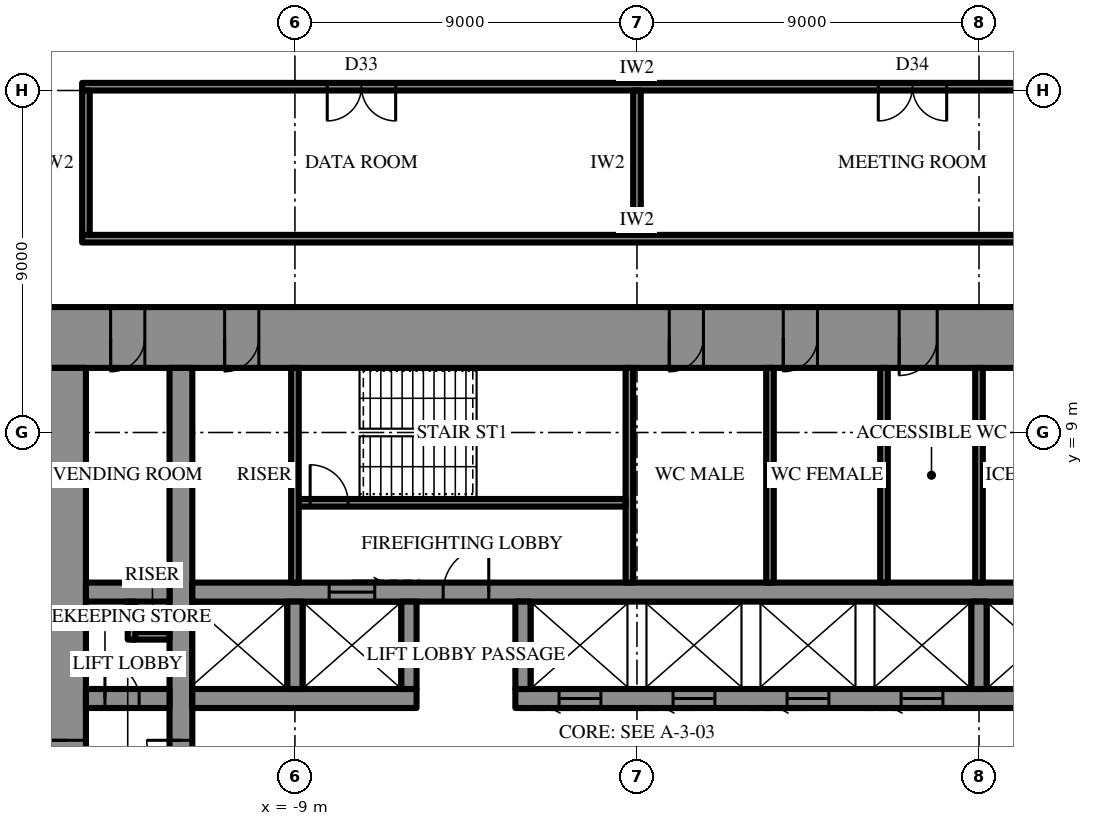
"""IFC4 building model, lengths in metres.
Left out: names, types, materials, properties, quantities, classifications, styles, units other than length and angle.
Written with IfcOpenShell. Run it as: python <this file> out.ifc"""

import sys

from ifc_helpers import new_model, si_unit, direction, frame, frame_2d, origin, place, context, subcontext, project, spatial, rectangle, extrude, element, fill, save


model = new_model("IFC4")
c1 = context("Model", 3, precision=1e-05, world=origin(), true_north=direction((0.0, 1.0)))
c2 = subcontext(c1, "Body", "Model", "MODEL_VIEW")
j1 = project(units=[si_unit("LENGTHUNIT", "METRE"), si_unit("PLANEANGLEUNIT", "RADIAN")], contexts=[c1])
p1 = place(None, origin())
s1 = spatial("IfcSite", under=j1, at=p1, CompositionType="ELEMENT")
p2 = place(p1, origin())
s2 = spatial("IfcBuilding", under=s1, at=p2, CompositionType="ELEMENT")
p3 = place(p2, frame((0.0, 0.0, 274.3)))
s3 = spatial("IfcBuildingStorey", under=s2, at=p3, CompositionType="ELEMENT", Elevation=274.3)
p4 = place(p3, frame((-15.5, 11.5, 0.0), z_axis=(0.0, 0.0, 1.0), x_axis=(1.0, 0.0, 0.0)))
e1 = element("IfcWall", 1, at=p4, inside=s3, PredefinedType="SHEAR", context=c2, shape_type="SweptSolid", body=[
    extrude(rectangle(XDim=31.0, YDim=1.6, at=frame_2d((15.5, 0.0))), origin(), (0.0, 0.0, 1.0), 4.2),
])
p5 = place(p4, frame((16.35, 0.0, 0.0)))
e2 = element("IfcOpeningElement", 2, at=p5, cuts=e1, PredefinedType="OPENING", context=c2, shape_type="SweptSolid", body=[
    extrude(rectangle(XDim=0.9, YDim=2.2, at=frame_2d((0.45, 1.1))), frame((0.0, 0.81, 0.0), z_axis=(0.0, -1.0, 0.0), x_axis=(1.0, 0.0, 0.0)), (0.0, 0.0, 1.0), 1.62),
])
p6 = place(p4, frame((19.35, 0.0, 0.0)))
e3 = element("IfcOpeningElement", 3, at=p6, cuts=e1, PredefinedType="OPENING", context=c2, shape_type="SweptSolid", body=[
    extrude(rectangle(XDim=0.9, YDim=2.2, at=frame_2d((0.45, 1.1))), frame((0.0, 0.81, 0.0), z_axis=(0.0, -1.0, 0.0), x_axis=(1.0, 0.0, 0.0)), (0.0, 0.0, 1.0), 1.62),
])
p7 = place(p4, frame((22.4, 0.0, 0.0)))
e4 = element("IfcOpeningElement", 4, at=p7, cuts=e1, PredefinedType="OPENING", context=c2, shape_type="SweptSolid", body=[
    extrude(rectangle(XDim=1.0, YDim=2.2, at=frame_2d((0.5, 1.1))), frame((0.0, 0.81, 0.0), z_axis=(0.0, -1.0, 0.0), x_axis=(1.0, 0.0, 0.0)), (0.0, 0.0, 1.0), 1.62),
])
p8 = place(p4, frame((1.65, 0.0, 0.0)))
e5 = element("IfcOpeningElement", 5, at=p8, cuts=e1, PredefinedType="OPENING", context=c2, shape_type="SweptSolid", body=[
    extrude(rectangle(XDim=0.9, YDim=2.2, at=frame_2d((0.45, 1.1))), frame((0.0, 0.81, 0.0), z_axis=(0.0, -1.0, 0.0), x_axis=(1.0, 0.0, 0.0)), (0.0, 0.0, 1.0), 1.62),
])
p9 = place(p4, frame((4.65, 0.0, 0.0)))
e6 = element("IfcOpeningElement", 6, at=p9, cuts=e1, PredefinedType="OPENING", context=c2, shape_type="SweptSolid", body=[
    extrude(rectangle(XDim=0.9, YDim=2.2, at=frame_2d((0.45, 1.1))), frame((0.0, 0.81, 0.0), z_axis=(0.0, -1.0, 0.0), x_axis=(1.0, 0.0, 0.0)), (0.0, 0.0, 1.0), 1.62),
])
p10 = place(p4, frame((25.45, 0.0, 0.0)))
e7 = element("IfcOpeningElement", 7, at=p10, cuts=e1, PredefinedType="OPENING", context=c2, shape_type="SweptSolid", body=[
    extrude(rectangle(XDim=0.9, YDim=2.2, at=frame_2d((0.45, 1.1))), frame((0.0, 0.81, 0.0), z_axis=(0.0, -1.0, 0.0), x_axis=(1.0, 0.0, 0.0)), (0.0, 0.0, 1.0), 1.62),
])
p11 = place(p4, frame((28.45, 0.0, 0.0)))
e8 = element("IfcOpeningElement", 8, at=p11, cuts=e1, PredefinedType="OPENING", context=c2, shape_type="SweptSolid", body=[
    extrude(rectangle(XDim=0.9, YDim=2.2, at=frame_2d((0.45, 1.1))), frame((0.0, 0.81, 0.0), z_axis=(0.0, -1.0, 0.0), x_axis=(1.0, 0.0, 0.0)), (0.0, 0.0, 1.0), 1.62),
])
p12 = place(p3, frame((-15.0, 10.7, 0.0), z_axis=(0.0, 0.0, 1.0), x_axis=(0.0, -1.0, 0.0)))
e9 = element("IfcWall", 9, at=p12, inside=s3, PredefinedType="SHEAR", context=c2, shape_type="SweptSolid", body=[
    extrude(rectangle(XDim=21.4, YDim=1.0, at=frame_2d((10.7, 0.0))), origin(), (0.0, 0.0, 1.0), 4.2),
])
p13 = place(p12, frame((9.8, 0.0, 0.0)))
e10 = element("IfcOpeningElement", 10, at=p13, cuts=e9, PredefinedType="OPENING", context=c2, shape_type="SweptSolid", body=[
    extrude(rectangle(XDim=1.8, YDim=2.4, at=frame_2d((0.9, 1.2))), frame((0.0, 0.51, 0.0), z_axis=(0.0, -1.0, 0.0), x_axis=(1.0, 0.0, 0.0)), (0.0, 0.0, 1.0), 1.02),
])
p14 = place(p3, frame((-12.0, -10.7, 0.0), z_axis=(0.0, 0.0, 1.0), x_axis=(0.0, 1.0, 0.0)))
e11 = element("IfcWall", 11, at=p14, inside=s3, PredefinedType="SHEAR", context=c2, shape_type="SweptSolid", body=[
    extrude(rectangle(XDim=21.4, YDim=0.6, at=frame_2d((10.7, 0.0))), origin(), (0.0, 0.0, 1.0), 4.2),
])
p15 = place(p14, frame((9.8, 0.0, 0.0)))
e12 = element("IfcOpeningElement", 12, at=p15, cuts=e11, PredefinedType="OPENING", context=c2, shape_type="SweptSolid", body=[
    extrude(rectangle(XDim=1.8, YDim=2.4, at=frame_2d((0.9, 1.2))), frame((0.0, 0.31, 0.0), z_axis=(0.0, -1.0, 0.0), x_axis=(1.0, 0.0, 0.0)), (0.0, 0.0, 1.0), 0.62),
])
p16 = place(p3, frame((-14.5, 2.0, 0.0), z_axis=(0.0, 0.0, 1.0), x_axis=(1.0, 0.0, 0.0)))
e13 = element("IfcWall", 13, at=p16, inside=s3, PredefinedType="SHEAR", context=c2, shape_type="SweptSolid", body=[
    extrude(rectangle(XDim=2.2, YDim=0.5, at=frame_2d((1.1, 0.0))), origin(), (0.0, 0.0, 1.0), 4.2),
])
p17 = place(p16, frame((0.5, 0.0, 0.0)))
e14 = element("IfcOpeningElement", 14, at=p17, cuts=e13, PredefinedType="OPENING", context=c2, shape_type="SweptSolid", body=[
    extrude(rectangle(XDim=0.9, YDim=2.2, at=frame_2d((0.45, 1.1))), frame((0.0, 0.26, 0.0), z_axis=(0.0, -1.0, 0.0), x_axis=(1.0, 0.0, 0.0)), (0.0, 0.0, 1.0), 0.52),
])
p18 = place(p3, frame((-11.7, 2.0, 0.0), z_axis=(0.0, 0.0, 1.0), x_axis=(1.0, 0.0, 0.0)))
e15 = element("IfcWall", 15, at=p18, inside=s3, PredefinedType="SHEAR", context=c2, shape_type="SweptSolid", body=[
    extrude(rectangle(XDim=5.9, YDim=0.5, at=frame_2d((2.95, 0.0))), origin(), (0.0, 0.0, 1.0), 4.2),
])
p19 = place(p3, frame((-3.2, 2.0, 0.0), z_axis=(0.0, 0.0, 1.0), x_axis=(1.0, 0.0, 0.0)))
e16 = element("IfcWall", 16, at=p19, inside=s3, PredefinedType="SHEAR", context=c2, shape_type="SweptSolid", body=[
    extrude(rectangle(XDim=14.9, YDim=0.5, at=frame_2d((7.45, 0.0))), origin(), (0.0, 0.0, 1.0), 4.2),
])
p20 = place(p19, frame((1.15, 0.0, 0.0)))
e17 = element("IfcOpeningElement", 17, at=p20, cuts=e16, PredefinedType="OPENING", context=c2, shape_type="SweptSolid", body=[
    extrude(rectangle(XDim=1.1, YDim=2.2, at=frame_2d((0.55, 1.1))), frame((0.0, 0.26, 0.0), z_axis=(0.0, -1.0, 0.0), x_axis=(1.0, 0.0, 0.0)), (0.0, 0.0, 1.0), 0.52),
])
p21 = place(p19, frame((4.15, 0.0, 0.0)))
e18 = element("IfcOpeningElement", 18, at=p21, cuts=e16, PredefinedType="OPENING", context=c2, shape_type="SweptSolid", body=[
    extrude(rectangle(XDim=1.1, YDim=2.2, at=frame_2d((0.55, 1.1))), frame((0.0, 0.26, 0.0), z_axis=(0.0, -1.0, 0.0), x_axis=(1.0, 0.0, 0.0)), (0.0, 0.0, 1.0), 0.52),
])
p22 = place(p19, frame((7.15, 0.0, 0.0)))
e19 = element("IfcOpeningElement", 19, at=p22, cuts=e16, PredefinedType="OPENING", context=c2, shape_type="SweptSolid", body=[
    extrude(rectangle(XDim=1.1, YDim=2.2, at=frame_2d((0.55, 1.1))), frame((0.0, 0.26, 0.0), z_axis=(0.0, -1.0, 0.0), x_axis=(1.0, 0.0, 0.0)), (0.0, 0.0, 1.0), 0.52),
])
p23 = place(p19, frame((10.15, 0.0, 0.0)))
e20 = element("IfcOpeningElement", 20, at=p23, cuts=e16, PredefinedType="OPENING", context=c2, shape_type="SweptSolid", body=[
    extrude(rectangle(XDim=1.1, YDim=2.2, at=frame_2d((0.55, 1.1))), frame((0.0, 0.26, 0.0), z_axis=(0.0, -1.0, 0.0), x_axis=(1.0, 0.0, 0.0)), (0.0, 0.0, 1.0), 0.52),
])
p24 = place(p3, frame((-14.5, 4.8, 0.0), z_axis=(0.0, 0.0, 1.0), x_axis=(1.0, 0.0, 0.0)))
e21 = element("IfcWall", 21, at=p24, inside=s3, PredefinedType="SHEAR", context=c2, shape_type="SweptSolid", body=[
    extrude(rectangle(XDim=2.2, YDim=0.5, at=frame_2d((1.1, 0.0))), origin(), (0.0, 0.0, 1.0), 4.2),
])
p25 = place(p3, frame((-11.7, 4.8, 0.0), z_axis=(0.0, 0.0, 1.0), x_axis=(1.0, 0.0, 0.0)))
e22 = element("IfcWall", 22, at=p25, inside=s3, PredefinedType="SHEAR", context=c2, shape_type="SweptSolid", body=[
    extrude(rectangle(XDim=23.4, YDim=0.5, at=frame_2d((11.7, 0.0))), origin(), (0.0, 0.0, 1.0), 4.2),
])
p26 = place(p25, frame((6.6, 0.0, 0.0)))
e23 = element("IfcOpeningElement", 23, at=p26, cuts=e22, PredefinedType="OPENING", context=c2, shape_type="SweptSolid", body=[
    extrude(rectangle(XDim=1.2, YDim=2.2, at=frame_2d((0.6, 1.1))), frame((0.0, 0.26, 0.0), z_axis=(0.0, -1.0, 0.0), x_axis=(1.0, 0.0, 0.0)), (0.0, 0.0, 1.0), 0.52),
])
p27 = place(p25, frame((3.6, 0.0, 0.0)))
e24 = element("IfcOpeningElement", 24, at=p27, cuts=e22, PredefinedType="OPENING", context=c2, shape_type="SweptSolid", body=[
    extrude(rectangle(XDim=1.2, YDim=2.2, at=frame_2d((0.6, 1.1))), frame((0.0, 0.26, 0.0), z_axis=(0.0, -1.0, 0.0), x_axis=(1.0, 0.0, 0.0)), (0.0, 0.0, 1.0), 0.52),
])
for number, where, z_axis, x_axis in (
    (25, (-9.0, 2.25, 0.0), (0.0, 0.0, 1.0), (0.0, 1.0, 0.0)),
    (26, (-6.0, 2.25, 0.0), (0.0, 0.0, 1.0), (0.0, 1.0, 0.0)),
    (27, (-3.0, 2.25, 0.0), (0.0, 0.0, 1.0), (0.0, 1.0, 0.0)),
    (28, (9.0, 2.25, 0.0), (0.0, 0.0, 1.0), (0.0, 1.0, 0.0)),
):
    element("IfcWall", number, at=place(p3, frame(where, z_axis=z_axis, x_axis=x_axis)), inside=s3, PredefinedType="SHEAR", context=c2, shape_type="SweptSolid", body=[
        extrude(rectangle(XDim=2.3, YDim=0.4, at=frame_2d((1.15, 0.0))), origin(), (0.0, 0.0, 1.0), 4.2),
    ])
p28 = place(p3, frame((-0.2, 5.05, 0.0), z_axis=(0.0, 0.0, 1.0), x_axis=(0.0, 1.0, 0.0)))
e29 = element("IfcWall", 29, at=p28, inside=s3, PredefinedType="SHEAR", context=c2, shape_type="SweptSolid", body=[
    extrude(rectangle(XDim=5.65, YDim=0.2, at=frame_2d((2.825, 0.0))), origin(), (0.0, 0.0, 1.0), 4.2),
])
p29 = place(p3, frame((-8.9, 7.15, 0.0), z_axis=(0.0, 0.0, 1.0), x_axis=(1.0, 0.0, 0.0)))
e30 = element("IfcWall", 30, at=p29, inside=s3, PredefinedType="SHEAR", context=c2, shape_type="SweptSolid", body=[
    extrude(rectangle(XDim=8.6, YDim=0.2, at=frame_2d((4.3, 0.0))), origin(), (0.0, 0.0, 1.0), 4.2),
])
p30 = place(p29, frame((0.3, 0.0, 0.0)))
e31 = element("IfcOpeningElement", 31, at=p30, cuts=e30, PredefinedType="OPENING", context=c2, shape_type="SweptSolid", body=[
    extrude(rectangle(XDim=1.0, YDim=2.2, at=frame_2d((0.5, 1.1))), frame((0.0, 0.11, 0.0), z_axis=(0.0, -1.0, 0.0), x_axis=(1.0, 0.0, 0.0)), (0.0, 0.0, 1.0), 0.22),
])
for number, where, z_axis, x_axis in (
    (32, (-9.0, 5.05, 0.0), (0.0, 0.0, 1.0), (0.0, 1.0, 0.0)),
    (33, (9.0, 5.05, 0.0), (0.0, 0.0, 1.0), (0.0, 1.0, 0.0)),
    (34, (3.5, 5.05, 0.0), (0.0, 0.0, 1.0), (0.0, 1.0, 0.0)),
    (35, (6.5, 5.05, 0.0), (0.0, 0.0, 1.0), (0.0, 1.0, 0.0)),
):
    element("IfcWall", number, at=place(p3, frame(where, z_axis=z_axis, x_axis=x_axis)), inside=s3, PredefinedType="PARTITIONING", context=c2, shape_type="SweptSolid", body=[
        extrude(rectangle(XDim=5.65, YDim=0.2, at=frame_2d((2.825, 0.0))), origin(), (0.0, 0.0, 1.0), 4.0),
    ])
for number, where, z_axis, x_axis in (
    (36, (-13.3, 3.65, 0.0), (0.0, 0.0, 1.0), (1.0, 0.0, 0.0)),
    (37, (-13.3, 3.55, 0.0), (0.0, 0.0, 1.0), (0.0, 1.0, 0.0)),
):
    element("IfcWall", number, at=place(p3, frame(where, z_axis=z_axis, x_axis=x_axis)), inside=s3, PredefinedType="PARTITIONING", context=c2, shape_type="SweptSolid", body=[
        extrude(rectangle(XDim=1.0, YDim=0.2, at=frame_2d((0.5, 0.0))), origin(), (0.0, 0.0, 1.0), 4.0),
    ])
p31 = place(p3, frame((-14.6, 14.1, 0.0), z_axis=(0.0, 0.0, 1.0), x_axis=(1.0, 0.0, 0.0)))
e38 = element("IfcWall", 38, at=p31, inside=s3, PredefinedType="PARTITIONING", context=c2, shape_type="SweptSolid", body=[
    extrude(rectangle(XDim=29.2, YDim=0.2, at=frame_2d((14.6, 0.0))), origin(), (0.0, 0.0, 1.0), 4.0),
])
p32 = place(p3, frame((-14.6, 18.1, 0.0), z_axis=(0.0, 0.0, 1.0), x_axis=(1.0, 0.0, 0.0)))
e39 = element("IfcWall", 39, at=p32, inside=s3, PredefinedType="PARTITIONING", context=c2, shape_type="SweptSolid", body=[
    extrude(rectangle(XDim=29.2, YDim=0.2, at=frame_2d((14.6, 0.0))), origin(), (0.0, 0.0, 1.0), 4.0),
])
p33 = place(p32, frame((6.45, 0.0, 0.0)))
e40 = element("IfcOpeningElement", 40, at=p33, cuts=e39, PredefinedType="OPENING", context=c2, shape_type="SweptSolid", body=[
    extrude(rectangle(XDim=1.8, YDim=2.4, at=frame_2d((0.9, 1.2))), frame((0.0, 0.11, 0.0), z_axis=(0.0, -1.0, 0.0), x_axis=(1.0, 0.0, 0.0)), (0.0, 0.0, 1.0), 0.22),
])
p34 = place(p32, frame((20.95, 0.0, 0.0)))
e41 = element("IfcOpeningElement", 41, at=p34, cuts=e39, PredefinedType="OPENING", context=c2, shape_type="SweptSolid", body=[
    extrude(rectangle(XDim=1.8, YDim=2.4, at=frame_2d((0.9, 1.2))), frame((0.0, 0.11, 0.0), z_axis=(0.0, -1.0, 0.0), x_axis=(1.0, 0.0, 0.0)), (0.0, 0.0, 1.0), 0.22),
])
p35 = place(p3, frame((-14.5, 14.2, 0.0), z_axis=(0.0, 0.0, 1.0), x_axis=(0.0, 1.0, 0.0)))
e42 = element("IfcWall", 42, at=p35, inside=s3, PredefinedType="PARTITIONING", context=c2, shape_type="SweptSolid", body=[
    extrude(rectangle(XDim=3.8, YDim=0.2, at=frame_2d((1.9, 0.0))), origin(), (0.0, 0.0, 1.0), 4.0),
])
p36 = place(p3, frame((0.0, 14.2, 0.0), z_axis=(0.0, 0.0, 1.0), x_axis=(0.0, 1.0, 0.0)))
e43 = element("IfcWall", 43, at=p36, inside=s3, PredefinedType="PARTITIONING", context=c2, shape_type="SweptSolid", body=[
    extrude(rectangle(XDim=3.8, YDim=0.2, at=frame_2d((1.9, 0.0))), origin(), (0.0, 0.0, 1.0), 2.992),
])
p37 = place(p13, frame((1.8, 0.0, 0.0), z_axis=(0.0, 0.0, 1.0), x_axis=(-1.0, 0.0, 0.0)))
e44 = element("IfcDoor", 44, at=p37, inside=s3, OperationType="DOUBLE_DOOR_SINGLE_SWING", PredefinedType="DOOR", context=c2, shape_type="SweptSolid", body=[
    extrude(rectangle(XDim=1.8, YDim=2.4, at=frame_2d((0.9, 1.2))), frame((0.0, 0.025, 0.0), z_axis=(0.0, -1.0, 0.0), x_axis=(1.0, 0.0, 0.0)), (0.0, 0.0, 1.0), 0.05),
])
fill(e10, e44)
p38 = place(p26, origin())
e45 = element("IfcDoor", 45, at=p38, inside=s3, OperationType="SINGLE_SWING_LEFT", PredefinedType="DOOR", context=c2, shape_type="SweptSolid", body=[
    extrude(rectangle(XDim=1.2, YDim=2.2, at=frame_2d((0.6, 1.1))), frame((0.0, 0.025, 0.0), z_axis=(0.0, -1.0, 0.0), x_axis=(1.0, 0.0, 0.0)), (0.0, 0.0, 1.0), 0.05),
])
fill(e23, e45)
p39 = place(p30, origin())
e46 = element("IfcDoor", 46, at=p39, inside=s3, OperationType="SINGLE_SWING_RIGHT", PredefinedType="DOOR", context=c2, shape_type="SweptSolid", body=[
    extrude(rectangle(XDim=1.0, YDim=2.2, at=frame_2d((0.5, 1.1))), frame((0.0, 0.025, 0.0), z_axis=(0.0, -1.0, 0.0), x_axis=(1.0, 0.0, 0.0)), (0.0, 0.0, 1.0), 0.05),
])
fill(e31, e46)
p40 = place(p5, frame((0.9, 0.0, 0.0), z_axis=(0.0, 0.0, 1.0), x_axis=(-1.0, 0.0, 0.0)))
e47 = element("IfcDoor", 47, at=p40, inside=s3, OperationType="SINGLE_SWING_LEFT", PredefinedType="DOOR", context=c2, shape_type="SweptSolid", body=[
    extrude(rectangle(XDim=0.9, YDim=2.2, at=frame_2d((0.45, 1.1))), frame((0.0, 0.025, 0.0), z_axis=(0.0, -1.0, 0.0), x_axis=(1.0, 0.0, 0.0)), (0.0, 0.0, 1.0), 0.05),
])
fill(e2, e47)
p41 = place(p6, frame((0.9, 0.0, 0.0), z_axis=(0.0, 0.0, 1.0), x_axis=(-1.0, 0.0, 0.0)))
e48 = element("IfcDoor", 48, at=p41, inside=s3, OperationType="SINGLE_SWING_LEFT", PredefinedType="DOOR", context=c2, shape_type="SweptSolid", body=[
    extrude(rectangle(XDim=0.9, YDim=2.2, at=frame_2d((0.45, 1.1))), frame((0.0, 0.025, 0.0), z_axis=(0.0, -1.0, 0.0), x_axis=(1.0, 0.0, 0.0)), (0.0, 0.0, 1.0), 0.05),
])
fill(e3, e48)
p42 = place(p7, frame((1.0, 0.0, 0.0), z_axis=(0.0, 0.0, 1.0), x_axis=(-1.0, 0.0, 0.0)))
e49 = element("IfcDoor", 49, at=p42, inside=s3, OperationType="SINGLE_SWING_LEFT", PredefinedType="DOOR", context=c2, shape_type="SweptSolid", body=[
    extrude(rectangle(XDim=1.0, YDim=2.2, at=frame_2d((0.5, 1.1))), frame((0.0, 0.025, 0.0), z_axis=(0.0, -1.0, 0.0), x_axis=(1.0, 0.0, 0.0)), (0.0, 0.0, 1.0), 0.05),
])
fill(e4, e49)
p43 = place(p8, frame((0.9, 0.0, 0.0), z_axis=(0.0, 0.0, 1.0), x_axis=(-1.0, 0.0, 0.0)))
e50 = element("IfcDoor", 50, at=p43, inside=s3, OperationType="SINGLE_SWING_LEFT", PredefinedType="DOOR", context=c2, shape_type="SweptSolid", body=[
    extrude(rectangle(XDim=0.9, YDim=2.2, at=frame_2d((0.45, 1.1))), frame((0.0, 0.025, 0.0), z_axis=(0.0, -1.0, 0.0), x_axis=(1.0, 0.0, 0.0)), (0.0, 0.0, 1.0), 0.05),
])
fill(e5, e50)
p44 = place(p9, frame((0.9, 0.0, 0.0), z_axis=(0.0, 0.0, 1.0), x_axis=(-1.0, 0.0, 0.0)))
e51 = element("IfcDoor", 51, at=p44, inside=s3, OperationType="SINGLE_SWING_LEFT", PredefinedType="DOOR", context=c2, shape_type="SweptSolid", body=[
    extrude(rectangle(XDim=0.9, YDim=2.2, at=frame_2d((0.45, 1.1))), frame((0.0, 0.025, 0.0), z_axis=(0.0, -1.0, 0.0), x_axis=(1.0, 0.0, 0.0)), (0.0, 0.0, 1.0), 0.05),
])
fill(e6, e51)
p45 = place(p17, origin())
e52 = element("IfcDoor", 52, at=p45, inside=s3, OperationType="SINGLE_SWING_RIGHT", PredefinedType="DOOR", context=c2, shape_type="SweptSolid", body=[
    extrude(rectangle(XDim=0.9, YDim=2.2, at=frame_2d((0.45, 1.1))), frame((0.0, 0.025, 0.0), z_axis=(0.0, -1.0, 0.0), x_axis=(1.0, 0.0, 0.0)), (0.0, 0.0, 1.0), 0.05),
])
fill(e14, e52)
p46 = place(p15, origin())
e53 = element("IfcDoor", 53, at=p46, inside=s3, OperationType="DOUBLE_DOOR_SINGLE_SWING", PredefinedType="DOOR", context=c2, shape_type="SweptSolid", body=[
    extrude(rectangle(XDim=1.8, YDim=2.4, at=frame_2d((0.9, 1.2))), frame((0.0, 0.025, 0.0), z_axis=(0.0, -1.0, 0.0), x_axis=(1.0, 0.0, 0.0)), (0.0, 0.0, 1.0), 0.05),
])
fill(e12, e53)
p47 = place(p27, origin())
e54 = element("IfcDoor", 54, at=p47, inside=s3, OperationType="SLIDING_TO_LEFT", PredefinedType="DOOR", context=c2, shape_type="SweptSolid", body=[
    extrude(rectangle(XDim=1.2, YDim=2.2, at=frame_2d((0.6, 1.1))), frame((0.0, 0.025, 0.0), z_axis=(0.0, -1.0, 0.0), x_axis=(1.0, 0.0, 0.0)), (0.0, 0.0, 1.0), 0.05),
])
fill(e24, e54)
p48 = place(p20, frame((1.1, 0.0, 0.0), z_axis=(0.0, 0.0, 1.0), x_axis=(-1.0, 0.0, 0.0)))
e55 = element("IfcDoor", 55, at=p48, inside=s3, OperationType="SLIDING_TO_LEFT", PredefinedType="DOOR", context=c2, shape_type="SweptSolid", body=[
    extrude(rectangle(XDim=1.1, YDim=2.2, at=frame_2d((0.55, 1.1))), frame((0.0, 0.025, 0.0), z_axis=(0.0, -1.0, 0.0), x_axis=(1.0, 0.0, 0.0)), (0.0, 0.0, 1.0), 0.05),
])
fill(e17, e55)
p49 = place(p21, frame((1.1, 0.0, 0.0), z_axis=(0.0, 0.0, 1.0), x_axis=(-1.0, 0.0, 0.0)))
e56 = element("IfcDoor", 56, at=p49, inside=s3, OperationType="SLIDING_TO_LEFT", PredefinedType="DOOR", context=c2, shape_type="SweptSolid", body=[
    extrude(rectangle(XDim=1.1, YDim=2.2, at=frame_2d((0.55, 1.1))), frame((0.0, 0.025, 0.0), z_axis=(0.0, -1.0, 0.0), x_axis=(1.0, 0.0, 0.0)), (0.0, 0.0, 1.0), 0.05),
])
fill(e18, e56)
p50 = place(p22, frame((1.1, 0.0, 0.0), z_axis=(0.0, 0.0, 1.0), x_axis=(-1.0, 0.0, 0.0)))
e57 = element("IfcDoor", 57, at=p50, inside=s3, OperationType="SLIDING_TO_LEFT", PredefinedType="DOOR", context=c2, shape_type="SweptSolid", body=[
    extrude(rectangle(XDim=1.1, YDim=2.2, at=frame_2d((0.55, 1.1))), frame((0.0, 0.025, 0.0), z_axis=(0.0, -1.0, 0.0), x_axis=(1.0, 0.0, 0.0)), (0.0, 0.0, 1.0), 0.05),
])
fill(e19, e57)
p51 = place(p23, frame((1.1, 0.0, 0.0), z_axis=(0.0, 0.0, 1.0), x_axis=(-1.0, 0.0, 0.0)))
e58 = element("IfcDoor", 58, at=p51, inside=s3, OperationType="SLIDING_TO_LEFT", PredefinedType="DOOR", context=c2, shape_type="SweptSolid", body=[
    extrude(rectangle(XDim=1.1, YDim=2.2, at=frame_2d((0.55, 1.1))), frame((0.0, 0.025, 0.0), z_axis=(0.0, -1.0, 0.0), x_axis=(1.0, 0.0, 0.0)), (0.0, 0.0, 1.0), 0.05),
])
fill(e20, e58)
p52 = place(p33, frame((1.8, 0.0, 0.0), z_axis=(0.0, 0.0, 1.0), x_axis=(-1.0, 0.0, 0.0)))
e59 = element("IfcDoor", 59, at=p52, inside=s3, OperationType="DOUBLE_DOOR_SINGLE_SWING", PredefinedType="DOOR", context=c2, shape_type="SweptSolid", body=[
    extrude(rectangle(XDim=1.8, YDim=2.4, at=frame_2d((0.9, 1.2))), frame((0.0, 0.025, 0.0), z_axis=(0.0, -1.0, 0.0), x_axis=(1.0, 0.0, 0.0)), (0.0, 0.0, 1.0), 0.05),
])
fill(e40, e59)
p53 = place(p34, frame((1.8, 0.0, 0.0), z_axis=(0.0, 0.0, 1.0), x_axis=(-1.0, 0.0, 0.0)))
e60 = element("IfcDoor", 60, at=p53, inside=s3, OperationType="DOUBLE_DOOR_SINGLE_SWING", PredefinedType="DOOR", context=c2, shape_type="SweptSolid", body=[
    extrude(rectangle(XDim=1.8, YDim=2.4, at=frame_2d((0.9, 1.2))), frame((0.0, 0.025, 0.0), z_axis=(0.0, -1.0, 0.0), x_axis=(1.0, 0.0, 0.0)), (0.0, 0.0, 1.0), 0.05),
])
fill(e41, e60)
save(model, sys.argv[1])
